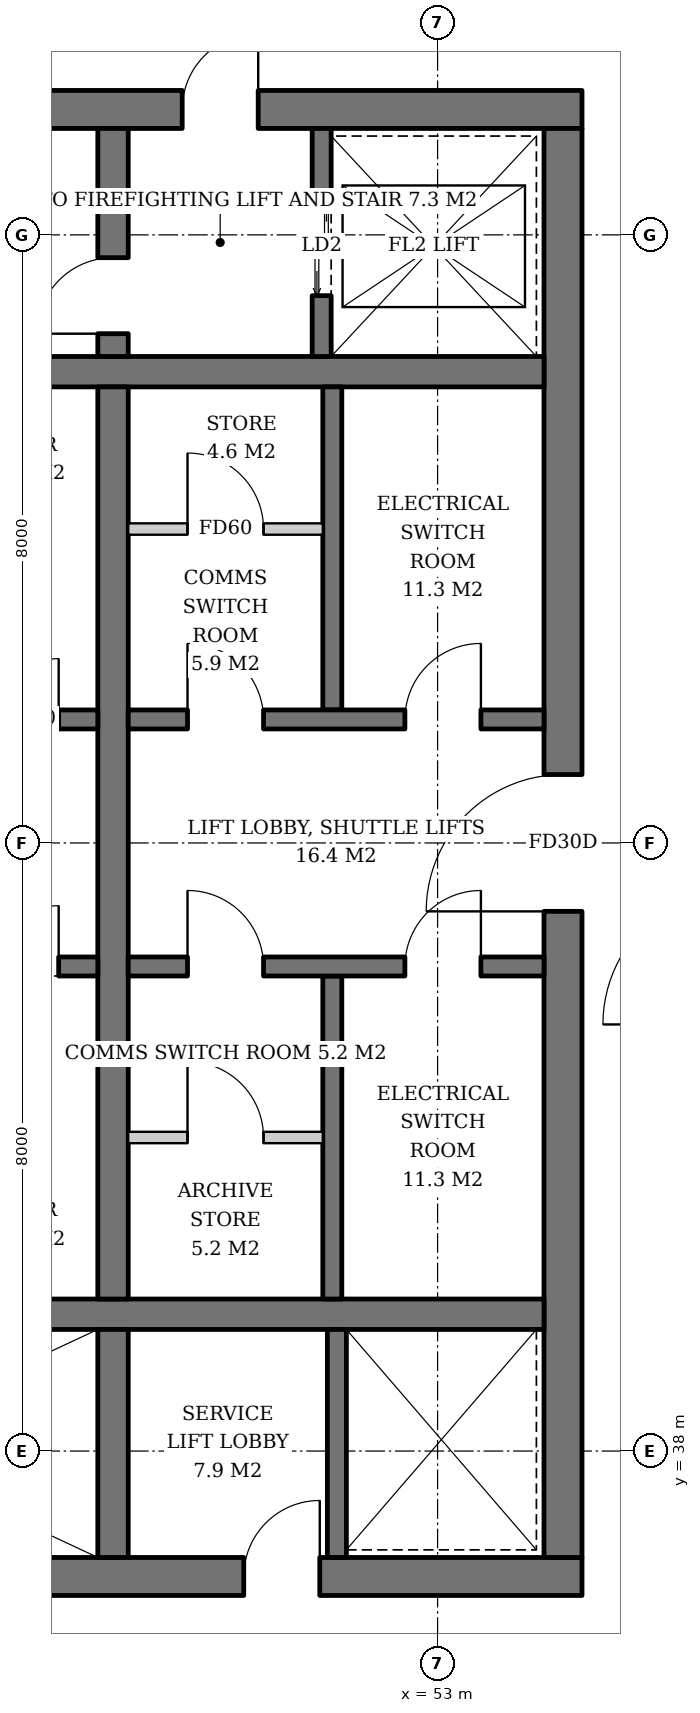
"""IFC4 building model, lengths in metres.
Left out: names, types, materials, properties, quantities, classifications, styles, units other than length and angle.
Written with IfcOpenShell. Run it as: python <this file> out.ifc"""

import sys

from ifc_helpers import new_model, si_unit, direction, frame, frame_2d, origin, origin_2d, place, context, subcontext, project, spatial, polyline, rectangle, outline, extrude, element, fill, save


model = new_model("IFC4")
c1 = context("Model", 3, precision=1e-05, world=origin(), true_north=direction((0.0, 1.0)))
c2 = subcontext(c1, "Body", "Model", "MODEL_VIEW")
j1 = project(units=[si_unit("LENGTHUNIT", "METRE"), si_unit("PLANEANGLEUNIT", "RADIAN")], contexts=[c1])
p1 = place(None, origin())
s1 = spatial("IfcSite", under=j1, at=p1, CompositionType="ELEMENT")
p2 = place(p1, origin())
s2 = spatial("IfcBuilding", under=s1, at=p2, CompositionType="ELEMENT")
p3 = place(p2, frame((0.0, 0.0, 290.8)))
s3 = spatial("IfcBuildingStorey", under=s2, at=p3, CompositionType="ELEMENT", Elevation=290.8)
p4 = place(p3, frame((56.278, 57.278, 0.019), z_axis=(-0.016368491785, -0.016368491785, 0.999732036574), x_axis=(0.707106781187, -0.707106781187, 0.0)))
e1 = element("IfcColumn", 1, at=p4, inside=s3, PredefinedType="COLUMN", context=c2, shape_type="SweptSolid", body=[
    extrude(rectangle(XDim=1.6, YDim=1.6, at=origin_2d()), origin(), (0.0, 0.0, 1.0), 7.398),
])
p5 = place(p3, frame((56.278, 34.722, 0.007), z_axis=(-0.036832736785, 0.036832736785, 0.998642428), x_axis=(-0.707106781187, -0.707106781187, 0.0)))
e2 = element("IfcColumn", 2, at=p5, inside=s3, PredefinedType="COLUMN", context=c2, shape_type="SweptSolid", body=[
    extrude(rectangle(XDim=1.6, YDim=1.6, at=origin_2d()), origin(), (0.0, 0.0, 1.0), 3.288),
])
p6 = place(p3, frame((35.1, 36.35, 0.0), z_axis=(0.0, 0.0, 1.0), x_axis=(1.0, 0.0, 0.0)))
e3 = element("IfcWall", 3, at=p6, inside=s3, PredefinedType="SHEAR", context=c2, shape_type="SweptSolid", body=[
    extrude(rectangle(XDim=19.8, YDim=0.5, at=frame_2d((9.9, 0.0))), origin(), (0.0, 0.0, 1.0), 3.67),
])
p7 = place(p6, frame((3.9, 0.0, 0.0)))
e4 = element("IfcOpeningElement", 4, at=p7, cuts=e3, PredefinedType="OPENING", context=c2, shape_type="SweptSolid", body=[
    extrude(rectangle(XDim=1.0, YDim=2.1, at=frame_2d((0.5, 1.05))), frame((0.0, 0.26, 0.0), z_axis=(0.0, -1.0, 0.0), x_axis=(1.0, 0.0, 0.0)), (0.0, 0.0, 1.0), 0.52),
])
p8 = place(p6, frame((15.35, 0.0, 0.0)))
e5 = element("IfcOpeningElement", 5, at=p8, cuts=e3, PredefinedType="OPENING", context=c2, shape_type="SweptSolid", body=[
    extrude(rectangle(XDim=1.0, YDim=2.1, at=frame_2d((0.5, 1.05))), frame((0.0, 0.26, 0.0), z_axis=(0.0, -1.0, 0.0), x_axis=(1.0, 0.0, 0.0)), (0.0, 0.0, 1.0), 0.52),
])
p9 = place(p3, frame((35.1, 55.65, 0.0), z_axis=(0.0, 0.0, 1.0), x_axis=(1.0, 0.0, 0.0)))
e6 = element("IfcWall", 6, at=p9, inside=s3, PredefinedType="SHEAR", context=c2, shape_type="SweptSolid", body=[
    extrude(rectangle(XDim=19.8, YDim=0.5, at=frame_2d((9.9, 0.0))), origin(), (0.0, 0.0, 1.0), 7.238),
])
p10 = place(p9, frame((14.54, 0.0, 0.0)))
e7 = element("IfcOpeningElement", 7, at=p10, cuts=e6, PredefinedType="OPENING", context=c2, shape_type="SweptSolid", body=[
    extrude(rectangle(XDim=1.0, YDim=2.1, at=frame_2d((0.5, 1.05))), frame((0.0, 0.26, 0.0), z_axis=(0.0, -1.0, 0.0), x_axis=(1.0, 0.0, 0.0)), (0.0, 0.0, 1.0), 0.52),
])
p11 = place(p9, frame((0.865, 0.0, 0.0)))
e8 = element("IfcOpeningElement", 8, at=p11, cuts=e6, PredefinedType="OPENING", context=c2, shape_type="SweptSolid", body=[
    extrude(rectangle(XDim=1.0, YDim=2.1, at=frame_2d((0.5, 1.05))), frame((0.0, 0.26, 0.0), z_axis=(0.0, -1.0, 0.0), x_axis=(1.0, 0.0, 0.0)), (0.0, 0.0, 1.0), 0.52),
])
p12 = place(p9, frame((2.399, 0.0, 0.0)))
e9 = element("IfcOpeningElement", 9, at=p12, cuts=e6, PredefinedType="OPENING", context=c2, shape_type="SweptSolid", body=[
    extrude(rectangle(XDim=1.0, YDim=2.1, at=frame_2d((0.5, 1.05))), frame((0.0, 0.26, 0.0), z_axis=(0.0, -1.0, 0.0), x_axis=(1.0, 0.0, 0.0)), (0.0, 0.0, 1.0), 0.52),
])
p13 = place(p9, frame((3.966, 0.0, 0.0)))
e10 = element("IfcOpeningElement", 10, at=p13, cuts=e6, PredefinedType="OPENING", context=c2, shape_type="SweptSolid", body=[
    extrude(rectangle(XDim=1.0, YDim=2.1, at=frame_2d((0.5, 1.05))), frame((0.0, 0.26, 0.0), z_axis=(0.0, -1.0, 0.0), x_axis=(1.0, 0.0, 0.0)), (0.0, 0.0, 1.0), 0.52),
])
p14 = place(p3, frame((54.65, 36.6, 0.0), z_axis=(0.0, 0.0, 1.0), x_axis=(0.0, 1.0, 0.0)))
e11 = element("IfcWall", 11, at=p14, inside=s3, PredefinedType="SHEAR", context=c2, shape_type="SweptSolid", body=[
    extrude(outline(polyline([(0.0, 0.0), (18.8, 0.0), (18.8, 7.238), (0.0, 3.762), (0.0, 0.0)])), frame((0.0, 0.25, 0.0), z_axis=(0.0, -1.0, 0.0), x_axis=(1.0, 0.0, 0.0)), (0.0, 0.0, 1.0), 0.5),
])
p15 = place(p14, frame((8.5, 0.0, 0.0)))
e12 = element("IfcOpeningElement", 12, at=p15, cuts=e11, PredefinedType="OPENING", context=c2, shape_type="SweptSolid", body=[
    extrude(rectangle(XDim=1.8, YDim=2.4, at=frame_2d((0.9, 1.2))), frame((0.0, 0.26, 0.0), z_axis=(0.0, -1.0, 0.0), x_axis=(1.0, 0.0, 0.0)), (0.0, 0.0, 1.0), 0.52),
])
p16 = place(p3, frame((35.6, 39.8, 0.0), z_axis=(0.0, 0.0, 1.0), x_axis=(1.0, 0.0, 0.0)))
e13 = element("IfcWall", 13, at=p16, inside=s3, PredefinedType="SHEAR", context=c2, shape_type="SweptSolid", body=[
    extrude(rectangle(XDim=18.8, YDim=0.4, at=frame_2d((9.4, 0.0))), origin(), (0.0, 0.0, 1.0), 4.317),
])
p17 = place(p3, frame((35.6, 52.2, 0.0), z_axis=(0.0, 0.0, 1.0), x_axis=(1.0, 0.0, 0.0)))
e14 = element("IfcWall", 14, at=p17, inside=s3, PredefinedType="SHEAR", context=c2, shape_type="SweptSolid", body=[
    extrude(rectangle(XDim=18.8, YDim=0.4, at=frame_2d((9.4, 0.0))), origin(), (0.0, 0.0, 1.0), 6.609),
])
p18 = place(p3, frame((48.73, 36.6, 0.0), z_axis=(0.0, 0.0, 1.0), x_axis=(0.0, 1.0, 0.0)))
e15 = element("IfcWall", 15, at=p18, inside=s3, PredefinedType="SHEAR", context=c2, shape_type="SweptSolid", body=[
    extrude(outline(polyline([(0.0, 0.0), (3.0, 0.0), (3.0, 4.317), (0.0, 3.762), (0.0, 0.0)])), frame((0.0, 0.2, 0.0), z_axis=(0.0, -1.0, 0.0), x_axis=(1.0, 0.0, 0.0)), (0.0, 0.0, 1.0), 0.4),
])
p19 = place(p3, frame((48.73, 40.0, 0.0), z_axis=(0.0, 0.0, 1.0), x_axis=(0.0, 1.0, 0.0)))
e16 = element("IfcWall", 16, at=p19, inside=s3, PredefinedType="SHEAR", context=c2, shape_type="SweptSolid", body=[
    extrude(outline(polyline([(0.0, 0.0), (12.0, 0.0), (12.0, 6.609), (0.0, 4.391), (0.0, 0.0)])), frame((0.0, 0.2, 0.0), z_axis=(0.0, -1.0, 0.0), x_axis=(1.0, 0.0, 0.0)), (0.0, 0.0, 1.0), 0.4),
])
p20 = place(p3, frame((48.73, 52.4, 0.0), z_axis=(0.0, 0.0, 1.0), x_axis=(0.0, 1.0, 0.0)))
e17 = element("IfcWall", 17, at=p20, inside=s3, PredefinedType="SHEAR", context=c2, shape_type="SweptSolid", body=[
    extrude(outline(polyline([(0.0, 0.0), (3.0, 0.0), (3.0, 7.238), (0.0, 6.683), (0.0, 0.0)])), frame((0.0, 0.2, 0.0), z_axis=(0.0, -1.0, 0.0), x_axis=(1.0, 0.0, 0.0)), (0.0, 0.0, 1.0), 0.4),
])
p21 = place(p20, frame((0.3, 0.0, 0.0)))
e18 = element("IfcOpeningElement", 18, at=p21, cuts=e17, PredefinedType="OPENING", context=c2, shape_type="SweptSolid", body=[
    extrude(rectangle(XDim=1.0, YDim=2.1, at=frame_2d((0.5, 1.05))), frame((0.0, 0.21, 0.0), z_axis=(0.0, -1.0, 0.0), x_axis=(1.0, 0.0, 0.0)), (0.0, 0.0, 1.0), 0.42),
])
p22 = place(p3, frame((51.675, 36.6, 0.0), z_axis=(0.0, 0.0, 1.0), x_axis=(0.0, 1.0, 0.0)))
e19 = element("IfcWall", 19, at=p22, inside=s3, PredefinedType="SHEAR", context=c2, shape_type="SweptSolid", body=[
    extrude(outline(polyline([(0.0, 0.0), (3.0, 0.0), (3.0, 4.317), (0.0, 3.762), (0.0, 0.0)])), frame((0.0, 0.125, 0.0), z_axis=(0.0, -1.0, 0.0), x_axis=(1.0, 0.0, 0.0)), (0.0, 0.0, 1.0), 0.25),
])
p23 = place(p3, frame((51.475, 52.4, 0.0), z_axis=(0.0, 0.0, 1.0), x_axis=(0.0, 1.0, 0.0)))
e20 = element("IfcWall", 20, at=p23, inside=s3, PredefinedType="SHEAR", context=c2, shape_type="SweptSolid", body=[
    extrude(outline(polyline([(0.0, 0.0), (3.0, 0.0), (3.0, 7.238), (0.0, 6.683), (0.0, 0.0)])), frame((0.0, 0.125, 0.0), z_axis=(0.0, -1.0, 0.0), x_axis=(1.0, 0.0, 0.0)), (0.0, 0.0, 1.0), 0.25),
])
p24 = place(p23, frame((0.8, 0.0, 0.0)))
e21 = element("IfcOpeningElement", 21, at=p24, cuts=e20, PredefinedType="OPENING", context=c2, shape_type="SweptSolid", body=[
    extrude(rectangle(XDim=1.3, YDim=2.2, at=frame_2d((0.65, 1.1))), frame((0.0, 0.135, 0.0), z_axis=(0.0, -1.0, 0.0), x_axis=(1.0, 0.0, 0.0)), (0.0, 0.0, 1.0), 0.27),
])
p25 = place(p3, frame((35.6, 47.625, 0.0), z_axis=(0.0, 0.0, 1.0), x_axis=(1.0, 0.0, 0.0)))
e22 = element("IfcWall", 22, at=p25, inside=s3, PredefinedType="SHEAR", context=c2, shape_type="SweptSolid", body=[
    extrude(rectangle(XDim=12.93, YDim=0.25, at=frame_2d((6.465, 0.0))), origin(), (0.0, 0.0, 1.0), 5.777),
])
p26 = place(p25, frame((9.1, 0.0, 0.0)))
e23 = element("IfcOpeningElement", 23, at=p26, cuts=e22, PredefinedType="OPENING", context=c2, shape_type="SweptSolid", body=[
    extrude(rectangle(XDim=1.0, YDim=2.1, at=frame_2d((0.5, 1.05))), frame((0.0, 0.135, 0.0), z_axis=(0.0, -1.0, 0.0), x_axis=(1.0, 0.0, 0.0)), (0.0, 0.0, 1.0), 0.27),
])
p27 = place(p25, frame((11.615, 0.0, 0.0)))
e24 = element("IfcOpeningElement", 24, at=p27, cuts=e22, PredefinedType="OPENING", context=c2, shape_type="SweptSolid", body=[
    extrude(rectangle(XDim=0.8, YDim=2.0, at=frame_2d((0.4, 1.0))), frame((0.0, 0.135, 0.0), z_axis=(0.0, -1.0, 0.0), x_axis=(1.0, 0.0, 0.0)), (0.0, 0.0, 1.0), 0.27),
])
p28 = place(p3, frame((35.6, 44.375, 0.0), z_axis=(0.0, 0.0, 1.0), x_axis=(1.0, 0.0, 0.0)))
e25 = element("IfcWall", 25, at=p28, inside=s3, PredefinedType="SHEAR", context=c2, shape_type="SweptSolid", body=[
    extrude(rectangle(XDim=12.93, YDim=0.25, at=frame_2d((6.465, 0.0))), origin(), (0.0, 0.0, 1.0), 5.177),
])
p29 = place(p28, frame((9.1, 0.0, 0.0)))
e26 = element("IfcOpeningElement", 26, at=p29, cuts=e25, PredefinedType="OPENING", context=c2, shape_type="SweptSolid", body=[
    extrude(rectangle(XDim=1.0, YDim=2.1, at=frame_2d((0.5, 1.05))), frame((0.0, 0.135, 0.0), z_axis=(0.0, -1.0, 0.0), x_axis=(1.0, 0.0, 0.0)), (0.0, 0.0, 1.0), 0.27),
])
p30 = place(p28, frame((11.615, 0.0, 0.0)))
e27 = element("IfcOpeningElement", 27, at=p30, cuts=e25, PredefinedType="OPENING", context=c2, shape_type="SweptSolid", body=[
    extrude(rectangle(XDim=0.8, YDim=2.0, at=frame_2d((0.4, 1.0))), frame((0.0, 0.135, 0.0), z_axis=(0.0, -1.0, 0.0), x_axis=(1.0, 0.0, 0.0)), (0.0, 0.0, 1.0), 0.27),
])
p31 = place(p3, frame((51.615, 47.75, 0.0), z_axis=(0.0, 0.0, 1.0), x_axis=(0.0, 1.0, 0.0)))
e28 = element("IfcWall", 28, at=p31, inside=s3, PredefinedType="SHEAR", context=c2, shape_type="SweptSolid", body=[
    extrude(outline(polyline([(0.0, 0.0), (4.25, 0.0), (4.25, 6.609), (0.0, 5.823), (0.0, 0.0)])), frame((0.0, 0.125, 0.0), z_axis=(0.0, -1.0, 0.0), x_axis=(1.0, 0.0, 0.0)), (0.0, 0.0, 1.0), 0.25),
])
p32 = place(p3, frame((48.93, 47.625, 0.0), z_axis=(0.0, 0.0, 1.0), x_axis=(1.0, 0.0, 0.0)))
e29 = element("IfcWall", 29, at=p32, inside=s3, PredefinedType="SHEAR", context=c2, shape_type="SweptSolid", body=[
    extrude(rectangle(XDim=5.47, YDim=0.25, at=frame_2d((2.735, 0.0))), origin(), (0.0, 0.0, 1.0), 5.777),
])
p33 = place(p32, frame((0.78, 0.0, 0.0)))
e30 = element("IfcOpeningElement", 30, at=p33, cuts=e29, PredefinedType="OPENING", context=c2, shape_type="SweptSolid", body=[
    extrude(rectangle(XDim=1.0, YDim=2.1, at=frame_2d((0.5, 1.05))), frame((0.0, 0.135, 0.0), z_axis=(0.0, -1.0, 0.0), x_axis=(1.0, 0.0, 0.0)), (0.0, 0.0, 1.0), 0.27),
])
p34 = place(p32, frame((3.64, 0.0, 0.0)))
e31 = element("IfcOpeningElement", 31, at=p34, cuts=e29, PredefinedType="OPENING", context=c2, shape_type="SweptSolid", body=[
    extrude(rectangle(XDim=1.0, YDim=2.1, at=frame_2d((0.5, 1.05))), frame((0.0, 0.135, 0.0), z_axis=(0.0, -1.0, 0.0), x_axis=(1.0, 0.0, 0.0)), (0.0, 0.0, 1.0), 0.27),
])
p35 = place(p3, frame((51.615, 44.25, 0.0), z_axis=(0.0, 0.0, 1.0), x_axis=(0.0, -1.0, 0.0)))
e32 = element("IfcWall", 32, at=p35, inside=s3, PredefinedType="SHEAR", context=c2, shape_type="SweptSolid", body=[
    extrude(outline(polyline([(0.0, 0.0), (4.25, 0.0), (4.25, 4.391), (0.0, 5.177), (0.0, 0.0)])), frame((0.0, 0.125, 0.0), z_axis=(0.0, -1.0, 0.0), x_axis=(1.0, 0.0, 0.0)), (0.0, 0.0, 1.0), 0.25),
])
p36 = place(p3, frame((48.93, 44.375, 0.0), z_axis=(0.0, 0.0, 1.0), x_axis=(1.0, 0.0, 0.0)))
e33 = element("IfcWall", 33, at=p36, inside=s3, PredefinedType="SHEAR", context=c2, shape_type="SweptSolid", body=[
    extrude(rectangle(XDim=5.47, YDim=0.25, at=frame_2d((2.735, 0.0))), origin(), (0.0, 0.0, 1.0), 5.177),
])
p37 = place(p36, frame((0.78, 0.0, 0.0)))
e34 = element("IfcOpeningElement", 34, at=p37, cuts=e33, PredefinedType="OPENING", context=c2, shape_type="SweptSolid", body=[
    extrude(rectangle(XDim=1.0, YDim=2.1, at=frame_2d((0.5, 1.05))), frame((0.0, 0.135, 0.0), z_axis=(0.0, -1.0, 0.0), x_axis=(1.0, 0.0, 0.0)), (0.0, 0.0, 1.0), 0.27),
])
p38 = place(p36, frame((3.64, 0.0, 0.0)))
e35 = element("IfcOpeningElement", 35, at=p38, cuts=e33, PredefinedType="OPENING", context=c2, shape_type="SweptSolid", body=[
    extrude(rectangle(XDim=1.0, YDim=2.1, at=frame_2d((0.5, 1.05))), frame((0.0, 0.135, 0.0), z_axis=(0.0, -1.0, 0.0), x_axis=(1.0, 0.0, 0.0)), (0.0, 0.0, 1.0), 0.27),
])
p39 = place(p3, frame((48.93, 50.13, 0.0), z_axis=(0.0, 0.0, 1.0), x_axis=(1.0, 0.0, 0.0)))
e36 = element("IfcWall", 36, at=p39, inside=s3, PredefinedType="SOLIDWALL", context=c2, shape_type="SweptSolid", body=[
    extrude(rectangle(XDim=2.56, YDim=0.15, at=frame_2d((1.28, 0.0))), origin(), (0.0, 0.0, 1.0), 6.25),
])
p40 = place(p39, frame((0.78, 0.0, 0.0)))
e37 = element("IfcOpeningElement", 37, at=p40, cuts=e36, PredefinedType="OPENING", context=c2, shape_type="SweptSolid", body=[
    extrude(rectangle(XDim=1.0, YDim=2.1, at=frame_2d((0.5, 1.05))), frame((0.0, 0.085, 0.0), z_axis=(0.0, -1.0, 0.0), x_axis=(1.0, 0.0, 0.0)), (0.0, 0.0, 1.0), 0.17),
])
p41 = place(p3, frame((48.93, 42.125, 0.0), z_axis=(0.0, 0.0, 1.0), x_axis=(1.0, 0.0, 0.0)))
e38 = element("IfcWall", 38, at=p41, inside=s3, PredefinedType="SOLIDWALL", context=c2, shape_type="SweptSolid", body=[
    extrude(rectangle(XDim=2.56, YDim=0.15, at=frame_2d((1.28, 0.0))), origin(), (0.0, 0.0, 1.0), 4.77),
])
p42 = place(p41, frame((0.78, 0.0, 0.0)))
e39 = element("IfcOpeningElement", 39, at=p42, cuts=e38, PredefinedType="OPENING", context=c2, shape_type="SweptSolid", body=[
    extrude(rectangle(XDim=1.0, YDim=2.1, at=frame_2d((0.5, 1.05))), frame((0.0, 0.085, 0.0), z_axis=(0.0, -1.0, 0.0), x_axis=(1.0, 0.0, 0.0)), (0.0, 0.0, 1.0), 0.17),
])
p43 = place(p24, origin())
e40 = element("IfcDoor", 40, at=p43, inside=s3, OperationType="DOUBLE_DOOR_SLIDING", PredefinedType="DOOR", context=c2, shape_type="SweptSolid", body=[
    extrude(rectangle(XDim=1.3, YDim=2.2, at=frame_2d((0.65, 1.1))), frame((0.0, 0.025, 0.0), z_axis=(0.0, -1.0, 0.0), x_axis=(1.0, 0.0, 0.0)), (0.0, 0.0, 1.0), 0.05),
])
fill(e21, e40)
p44 = place(p27, origin())
e41 = element("IfcDoor", 41, at=p44, inside=s3, OperationType="SINGLE_SWING_RIGHT", PredefinedType="DOOR", context=c2, shape_type="SweptSolid", body=[
    extrude(rectangle(XDim=0.8, YDim=2.0, at=frame_2d((0.4, 1.0))), frame((0.0, 0.025, 0.0), z_axis=(0.0, -1.0, 0.0), x_axis=(1.0, 0.0, 0.0)), (0.0, 0.0, 1.0), 0.05),
])
fill(e24, e41)
p45 = place(p30, origin())
e42 = element("IfcDoor", 42, at=p45, inside=s3, OperationType="SINGLE_SWING_RIGHT", PredefinedType="DOOR", context=c2, shape_type="SweptSolid", body=[
    extrude(rectangle(XDim=0.8, YDim=2.0, at=frame_2d((0.4, 1.0))), frame((0.0, 0.025, 0.0), z_axis=(0.0, -1.0, 0.0), x_axis=(1.0, 0.0, 0.0)), (0.0, 0.0, 1.0), 0.05),
])
fill(e27, e42)
p46 = place(p33, origin())
e43 = element("IfcDoor", 43, at=p46, inside=s3, OperationType="SINGLE_SWING_LEFT", PredefinedType="DOOR", context=c2, shape_type="SweptSolid", body=[
    extrude(rectangle(XDim=1.0, YDim=2.1, at=frame_2d((0.5, 1.05))), frame((0.0, 0.025, 0.0), z_axis=(0.0, -1.0, 0.0), x_axis=(1.0, 0.0, 0.0)), (0.0, 0.0, 1.0), 0.05),
])
fill(e30, e43)
p47 = place(p34, origin())
e44 = element("IfcDoor", 44, at=p47, inside=s3, OperationType="SINGLE_SWING_RIGHT", PredefinedType="DOOR", context=c2, shape_type="SweptSolid", body=[
    extrude(rectangle(XDim=1.0, YDim=2.1, at=frame_2d((0.5, 1.05))), frame((0.0, 0.025, 0.0), z_axis=(0.0, -1.0, 0.0), x_axis=(1.0, 0.0, 0.0)), (0.0, 0.0, 1.0), 0.05),
])
fill(e31, e44)
p48 = place(p37, origin())
e45 = element("IfcDoor", 45, at=p48, inside=s3, OperationType="SINGLE_SWING_LEFT", PredefinedType="DOOR", context=c2, shape_type="SweptSolid", body=[
    extrude(rectangle(XDim=1.0, YDim=2.1, at=frame_2d((0.5, 1.05))), frame((0.0, 0.025, 0.0), z_axis=(0.0, -1.0, 0.0), x_axis=(1.0, 0.0, 0.0)), (0.0, 0.0, 1.0), 0.05),
])
fill(e34, e45)
p49 = place(p38, origin())
e46 = element("IfcDoor", 46, at=p49, inside=s3, OperationType="SINGLE_SWING_RIGHT", PredefinedType="DOOR", context=c2, shape_type="SweptSolid", body=[
    extrude(rectangle(XDim=1.0, YDim=2.1, at=frame_2d((0.5, 1.05))), frame((0.0, 0.025, 0.0), z_axis=(0.0, -1.0, 0.0), x_axis=(1.0, 0.0, 0.0)), (0.0, 0.0, 1.0), 0.05),
])
fill(e35, e46)
p50 = place(p40, origin())
e47 = element("IfcDoor", 47, at=p50, inside=s3, OperationType="SINGLE_SWING_LEFT", PredefinedType="DOOR", context=c2, shape_type="SweptSolid", body=[
    extrude(rectangle(XDim=1.0, YDim=2.1, at=frame_2d((0.5, 1.05))), frame((0.0, 0.025, 0.0), z_axis=(0.0, -1.0, 0.0), x_axis=(1.0, 0.0, 0.0)), (0.0, 0.0, 1.0), 0.05),
])
fill(e37, e47)
p51 = place(p42, origin())
e48 = element("IfcDoor", 48, at=p51, inside=s3, OperationType="SINGLE_SWING_LEFT", PredefinedType="DOOR", context=c2, shape_type="SweptSolid", body=[
    extrude(rectangle(XDim=1.0, YDim=2.1, at=frame_2d((0.5, 1.05))), frame((0.0, 0.025, 0.0), z_axis=(0.0, -1.0, 0.0), x_axis=(1.0, 0.0, 0.0)), (0.0, 0.0, 1.0), 0.05),
])
fill(e39, e48)
p52 = place(p21, origin())
e49 = element("IfcDoor", 49, at=p52, inside=s3, OperationType="SINGLE_SWING_LEFT", PredefinedType="DOOR", context=c2, shape_type="SweptSolid", body=[
    extrude(rectangle(XDim=1.0, YDim=2.1, at=frame_2d((0.5, 1.05))), frame((0.0, 0.025, 0.0), z_axis=(0.0, -1.0, 0.0), x_axis=(1.0, 0.0, 0.0)), (0.0, 0.0, 1.0), 0.05),
])
fill(e18, e49)
p53 = place(p10, origin())
e50 = element("IfcDoor", 50, at=p53, inside=s3, OperationType="SINGLE_SWING_RIGHT", PredefinedType="DOOR", context=c2, shape_type="SweptSolid", body=[
    extrude(rectangle(XDim=1.0, YDim=2.1, at=frame_2d((0.5, 1.05))), frame((0.0, 0.025, 0.0), z_axis=(0.0, -1.0, 0.0), x_axis=(1.0, 0.0, 0.0)), (0.0, 0.0, 1.0), 0.05),
])
fill(e7, e50)
p54 = place(p15, origin())
e51 = element("IfcDoor", 51, at=p54, inside=s3, OperationType="DOUBLE_DOOR_SINGLE_SWING", PredefinedType="DOOR", context=c2, shape_type="SweptSolid", body=[
    extrude(rectangle(XDim=1.8, YDim=2.4, at=frame_2d((0.9, 1.2))), frame((0.0, 0.025, 0.0), z_axis=(0.0, -1.0, 0.0), x_axis=(1.0, 0.0, 0.0)), (0.0, 0.0, 1.0), 0.05),
])
fill(e12, e51)
p55 = place(p8, origin())
e52 = element("IfcDoor", 52, at=p55, inside=s3, OperationType="SINGLE_SWING_RIGHT", PredefinedType="DOOR", context=c2, shape_type="SweptSolid", body=[
    extrude(rectangle(XDim=1.0, YDim=2.1, at=frame_2d((0.5, 1.05))), frame((0.0, 0.025, 0.0), z_axis=(0.0, -1.0, 0.0), x_axis=(1.0, 0.0, 0.0)), (0.0, 0.0, 1.0), 0.05),
])
fill(e5, e52)
save(model, sys.argv[1])
